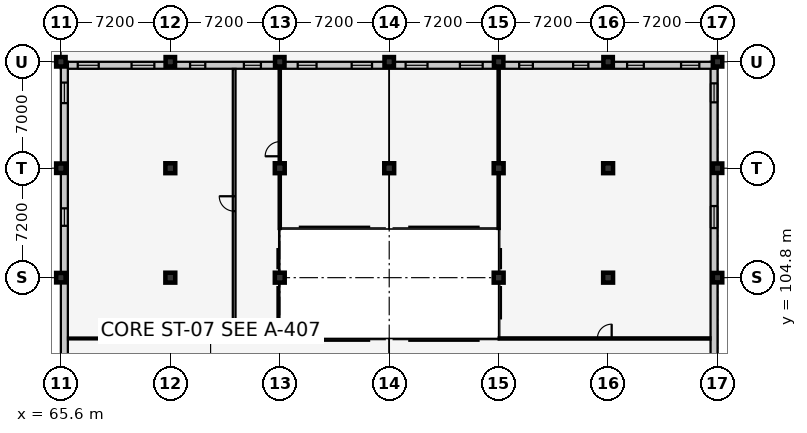
"""IFC4 building model, lengths in metres.
Left out: names, types, materials, properties, quantities, classifications, styles, units other than length and angle.
Written with IfcOpenShell. Run it as: python <this file> out.ifc"""

import sys

from ifc_helpers import new_model, si_unit, direction, frame, frame_2d, origin, origin_2d, place, context, subcontext, project, spatial, rectangle, extrude, element, fill, save


model = new_model("IFC4")
c1 = context("Model", 3, precision=1e-05, world=origin(), true_north=direction((0.0, 1.0)))
c2 = subcontext(c1, "Body", "Model", "MODEL_VIEW")
j1 = project(units=[si_unit("LENGTHUNIT", "METRE"), si_unit("PLANEANGLEUNIT", "RADIAN")], contexts=[c1])
p1 = place(None, origin())
s1 = spatial("IfcSite", under=j1, at=p1, CompositionType="ELEMENT")
p2 = place(p1, origin())
s2 = spatial("IfcBuilding", under=s1, at=p2, CompositionType="ELEMENT")
p3 = place(p2, frame((0.0, 0.0, 5.4)))
s3 = spatial("IfcBuildingStorey", under=s2, at=p3, CompositionType="ELEMENT", Elevation=5.4)
for number, where, z_axis, x_axis in (
    (1, (65.6, 104.8, 0.0), (0.0, 0.0, 1.0), (1.0, 0.0, 0.0)),
    (2, (65.6, 112.0, 0.0), (0.0, 0.0, 1.0), (1.0, 0.0, 0.0)),
    (3, (65.6, 119.0, 0.0), (0.0, 0.0, 1.0), (1.0, 0.0, 0.0)),
):
    element("IfcColumn", number, at=place(p3, frame(where, z_axis=z_axis, x_axis=x_axis)), inside=s3, PredefinedType="COLUMN", context=c2, shape_type="SweptSolid", body=[
        extrude(rectangle(XDim=0.62, YDim=0.62, at=origin_2d()), origin(), (0.0, 0.0, 1.0), 4.2),
    ])
for number, where, z_axis, x_axis in (
    (4, (72.8, 104.8, 0.0), (0.0, 0.0, 1.0), (1.0, 0.0, 0.0)),
    (5, (72.8, 112.0, 0.0), (0.0, 0.0, 1.0), (1.0, 0.0, 0.0)),
):
    element("IfcColumn", number, at=place(p3, frame(where, z_axis=z_axis, x_axis=x_axis)), inside=s3, PredefinedType="COLUMN", context=c2, shape_type="SweptSolid", body=[
        extrude(rectangle(XDim=0.65, YDim=0.65, at=origin_2d()), origin(), (0.0, 0.0, 1.0), 4.2),
    ])
p4 = place(p3, frame((72.8, 119.0, 0.0), z_axis=(0.0, 0.0, 1.0), x_axis=(1.0, 0.0, 0.0)))
e6 = element("IfcColumn", 6, at=p4, inside=s3, PredefinedType="COLUMN", context=c2, shape_type="SweptSolid", body=[
    extrude(rectangle(XDim=0.62, YDim=0.62, at=origin_2d()), origin(), (0.0, 0.0, 1.0), 4.2),
])
for number, where, z_axis, x_axis in (
    (7, (80.0, 104.8, 0.0), (0.0, 0.0, 1.0), (1.0, 0.0, 0.0)),
    (8, (80.0, 112.0, 0.0), (0.0, 0.0, 1.0), (1.0, 0.0, 0.0)),
):
    element("IfcColumn", number, at=place(p3, frame(where, z_axis=z_axis, x_axis=x_axis)), inside=s3, PredefinedType="COLUMN", context=c2, shape_type="SweptSolid", body=[
        extrude(rectangle(XDim=0.65, YDim=0.65, at=origin_2d()), origin(), (0.0, 0.0, 1.0), 4.2),
    ])
p5 = place(p3, frame((80.0, 119.0, 0.0), z_axis=(0.0, 0.0, 1.0), x_axis=(1.0, 0.0, 0.0)))
e9 = element("IfcColumn", 9, at=p5, inside=s3, PredefinedType="COLUMN", context=c2, shape_type="SweptSolid", body=[
    extrude(rectangle(XDim=0.62, YDim=0.62, at=origin_2d()), origin(), (0.0, 0.0, 1.0), 4.2),
])
p6 = place(p3, frame((87.2, 112.0, 0.0), z_axis=(0.0, 0.0, 1.0), x_axis=(1.0, 0.0, 0.0)))
e10 = element("IfcColumn", 10, at=p6, inside=s3, PredefinedType="COLUMN", context=c2, shape_type="SweptSolid", body=[
    extrude(rectangle(XDim=0.65, YDim=0.65, at=origin_2d()), origin(), (0.0, 0.0, 1.0), 4.2),
])
p7 = place(p3, frame((87.2, 119.0, 0.0), z_axis=(0.0, 0.0, 1.0), x_axis=(1.0, 0.0, 0.0)))
e11 = element("IfcColumn", 11, at=p7, inside=s3, PredefinedType="COLUMN", context=c2, shape_type="SweptSolid", body=[
    extrude(rectangle(XDim=0.62, YDim=0.62, at=origin_2d()), origin(), (0.0, 0.0, 1.0), 4.2),
])
for number, where, z_axis, x_axis in (
    (12, (94.4, 104.8, 0.0), (0.0, 0.0, 1.0), (1.0, 0.0, 0.0)),
    (13, (94.4, 112.0, 0.0), (0.0, 0.0, 1.0), (1.0, 0.0, 0.0)),
):
    element("IfcColumn", number, at=place(p3, frame(where, z_axis=z_axis, x_axis=x_axis)), inside=s3, PredefinedType="COLUMN", context=c2, shape_type="SweptSolid", body=[
        extrude(rectangle(XDim=0.65, YDim=0.65, at=origin_2d()), origin(), (0.0, 0.0, 1.0), 4.2),
    ])
p8 = place(p3, frame((94.4, 119.0, 0.0), z_axis=(0.0, 0.0, 1.0), x_axis=(1.0, 0.0, 0.0)))
e14 = element("IfcColumn", 14, at=p8, inside=s3, PredefinedType="COLUMN", context=c2, shape_type="SweptSolid", body=[
    extrude(rectangle(XDim=0.62, YDim=0.62, at=origin_2d()), origin(), (0.0, 0.0, 1.0), 4.2),
])
for number, where, z_axis, x_axis in (
    (15, (101.6, 104.8, 0.0), (0.0, 0.0, 1.0), (1.0, 0.0, 0.0)),
    (16, (101.6, 112.0, 0.0), (0.0, 0.0, 1.0), (1.0, 0.0, 0.0)),
):
    element("IfcColumn", number, at=place(p3, frame(where, z_axis=z_axis, x_axis=x_axis)), inside=s3, PredefinedType="COLUMN", context=c2, shape_type="SweptSolid", body=[
        extrude(rectangle(XDim=0.65, YDim=0.65, at=origin_2d()), origin(), (0.0, 0.0, 1.0), 4.2),
    ])
for number, where, z_axis, x_axis in (
    (17, (101.6, 119.0, 0.0), (0.0, 0.0, 1.0), (1.0, 0.0, 0.0)),
    (18, (108.8, 104.8, 0.0), (0.0, 0.0, 1.0), (1.0, 0.0, 0.0)),
    (19, (108.8, 112.0, 0.0), (0.0, 0.0, 1.0), (1.0, 0.0, 0.0)),
    (20, (108.8, 119.0, 0.0), (0.0, 0.0, 1.0), (1.0, 0.0, 0.0)),
):
    element("IfcColumn", number, at=place(p3, frame(where, z_axis=z_axis, x_axis=x_axis)), inside=s3, PredefinedType="COLUMN", context=c2, shape_type="SweptSolid", body=[
        extrude(rectangle(XDim=0.62, YDim=0.62, at=origin_2d()), origin(), (0.0, 0.0, 1.0), 4.2),
    ])
p9 = place(p3, frame((108.57, 119.0, 0.0), z_axis=(0.0, 0.0, 1.0), x_axis=(0.0, -1.0, 0.0)))
e21 = element("IfcWall", 21, at=p9, inside=s3, PredefinedType="SOLIDWALL", context=c2, shape_type="SweptSolid", body=[
    extrude(rectangle(XDim=28.6, YDim=0.46, at=frame_2d((14.3, 0.0))), origin(), (0.0, 0.0, 1.0), 3.175),
])
p10 = place(p9, frame((1.418, 0.0, 0.9)))
e22 = element("IfcOpeningElement", 22, at=p10, cuts=e21, PredefinedType="OPENING", context=c2, shape_type="SweptSolid", body=[
    extrude(rectangle(XDim=1.25, YDim=1.45, at=frame_2d((0.625, 0.725))), frame((0.0, 0.242, 0.0), z_axis=(0.0, -1.0, 0.0), x_axis=(1.0, 0.0, 0.0)), (0.0, 0.0, 1.0), 0.484),
])
p11 = place(p9, frame((9.489, 0.0, 0.9)))
e23 = element("IfcOpeningElement", 23, at=p11, cuts=e21, PredefinedType="OPENING", context=c2, shape_type="SweptSolid", body=[
    extrude(rectangle(XDim=1.45, YDim=1.45, at=frame_2d((0.725, 0.725))), frame((0.0, 0.242, 0.0), z_axis=(0.0, -1.0, 0.0), x_axis=(1.0, 0.0, 0.0)), (0.0, 0.0, 1.0), 0.484),
])
p12 = place(p9, frame((25.932, 0.0, 0.9)))
e24 = element("IfcOpeningElement", 24, at=p12, cuts=e21, PredefinedType="OPENING", context=c2, shape_type="SweptSolid", body=[
    extrude(rectangle(XDim=1.25, YDim=1.6, at=frame_2d((0.625, 0.8))), frame((0.0, 0.242, 0.0), z_axis=(0.0, -1.0, 0.0), x_axis=(1.0, 0.0, 0.0)), (0.0, 0.0, 1.0), 0.484),
])
p13 = place(p3, frame((65.6, 118.77, 0.0), z_axis=(0.0, 0.0, 1.0), x_axis=(1.0, 0.0, 0.0)))
e25 = element("IfcWall", 25, at=p13, inside=s3, PredefinedType="SOLIDWALL", context=c2, shape_type="SweptSolid", body=[
    extrude(rectangle(XDim=43.2, YDim=0.46, at=frame_2d((21.6, 0.0))), origin(), (0.0, 0.0, 1.0), 3.215),
])
p14 = place(p13, frame((1.11, 0.0, 0.9)))
e26 = element("IfcOpeningElement", 26, at=p14, cuts=e25, PredefinedType="OPENING", context=c2, shape_type="SweptSolid", body=[
    extrude(rectangle(XDim=1.38, YDim=1.6, at=frame_2d((0.69, 0.8))), frame((0.0, 0.242, 0.0), z_axis=(0.0, -1.0, 0.0), x_axis=(1.0, 0.0, 0.0)), (0.0, 0.0, 1.0), 0.484),
])
p15 = place(p13, frame((4.65, 0.0, 0.9)))
e27 = element("IfcOpeningElement", 27, at=p15, cuts=e25, PredefinedType="OPENING", context=c2, shape_type="SweptSolid", body=[
    extrude(rectangle(XDim=1.5, YDim=1.6, at=frame_2d((0.75, 0.8))), frame((0.0, 0.242, 0.0), z_axis=(0.0, -1.0, 0.0), x_axis=(1.0, 0.0, 0.0)), (0.0, 0.0, 1.0), 0.484),
])
p16 = place(p13, frame((8.5, 0.0, 0.9)))
e28 = element("IfcOpeningElement", 28, at=p16, cuts=e25, PredefinedType="OPENING", context=c2, shape_type="SweptSolid", body=[
    extrude(rectangle(XDim=1.0, YDim=1.75, at=frame_2d((0.5, 0.875))), frame((0.0, 0.242, 0.0), z_axis=(0.0, -1.0, 0.0), x_axis=(1.0, 0.0, 0.0)), (0.0, 0.0, 1.0), 0.484),
])
p17 = place(p13, frame((12.04, 0.0, 0.9)))
e29 = element("IfcOpeningElement", 29, at=p17, cuts=e25, PredefinedType="OPENING", context=c2, shape_type="SweptSolid", body=[
    extrude(rectangle(XDim=1.12, YDim=1.75, at=frame_2d((0.56, 0.875))), frame((0.0, 0.242, 0.0), z_axis=(0.0, -1.0, 0.0), x_axis=(1.0, 0.0, 0.0)), (0.0, 0.0, 1.0), 0.484),
])
p18 = place(p13, frame((15.58, 0.0, 0.9)))
e30 = element("IfcOpeningElement", 30, at=p18, cuts=e25, PredefinedType="OPENING", context=c2, shape_type="SweptSolid", body=[
    extrude(rectangle(XDim=1.24, YDim=1.75, at=frame_2d((0.62, 0.875))), frame((0.0, 0.242, 0.0), z_axis=(0.0, -1.0, 0.0), x_axis=(1.0, 0.0, 0.0)), (0.0, 0.0, 1.0), 0.484),
])
p19 = place(p13, frame((19.13, 0.0, 0.9)))
e31 = element("IfcOpeningElement", 31, at=p19, cuts=e25, PredefinedType="OPENING", context=c2, shape_type="SweptSolid", body=[
    extrude(rectangle(XDim=1.34, YDim=1.75, at=frame_2d((0.67, 0.875))), frame((0.0, 0.242, 0.0), z_axis=(0.0, -1.0, 0.0), x_axis=(1.0, 0.0, 0.0)), (0.0, 0.0, 1.0), 0.484),
])
p20 = place(p13, frame((22.68, 0.0, 0.9)))
e32 = element("IfcOpeningElement", 32, at=p20, cuts=e25, PredefinedType="OPENING", context=c2, shape_type="SweptSolid", body=[
    extrude(rectangle(XDim=1.44, YDim=1.75, at=frame_2d((0.72, 0.875))), frame((0.0, 0.242, 0.0), z_axis=(0.0, -1.0, 0.0), x_axis=(1.0, 0.0, 0.0)), (0.0, 0.0, 1.0), 0.484),
])
p21 = place(p13, frame((26.25, 0.0, 0.9)))
e33 = element("IfcOpeningElement", 33, at=p21, cuts=e25, PredefinedType="OPENING", context=c2, shape_type="SweptSolid", body=[
    extrude(rectangle(XDim=1.5, YDim=1.75, at=frame_2d((0.75, 0.875))), frame((0.0, 0.242, 0.0), z_axis=(0.0, -1.0, 0.0), x_axis=(1.0, 0.0, 0.0)), (0.0, 0.0, 1.0), 0.484),
])
p22 = place(p13, frame((30.15, 0.0, 0.9)))
e34 = element("IfcOpeningElement", 34, at=p22, cuts=e25, PredefinedType="OPENING", context=c2, shape_type="SweptSolid", body=[
    extrude(rectangle(XDim=0.9, YDim=1.35, at=frame_2d((0.45, 0.675))), frame((0.0, 0.242, 0.0), z_axis=(0.0, -1.0, 0.0), x_axis=(1.0, 0.0, 0.0)), (0.0, 0.0, 1.0), 0.484),
])
p23 = place(p13, frame((33.7, 0.0, 0.9)))
e35 = element("IfcOpeningElement", 35, at=p23, cuts=e25, PredefinedType="OPENING", context=c2, shape_type="SweptSolid", body=[
    extrude(rectangle(XDim=1.0, YDim=1.35, at=frame_2d((0.5, 0.675))), frame((0.0, 0.242, 0.0), z_axis=(0.0, -1.0, 0.0), x_axis=(1.0, 0.0, 0.0)), (0.0, 0.0, 1.0), 0.484),
])
p24 = place(p13, frame((37.25, 0.0, 0.9)))
e36 = element("IfcOpeningElement", 36, at=p24, cuts=e25, PredefinedType="OPENING", context=c2, shape_type="SweptSolid", body=[
    extrude(rectangle(XDim=1.1, YDim=1.35, at=frame_2d((0.55, 0.675))), frame((0.0, 0.242, 0.0), z_axis=(0.0, -1.0, 0.0), x_axis=(1.0, 0.0, 0.0)), (0.0, 0.0, 1.0), 0.484),
])
p25 = place(p13, frame((40.8, 0.0, 0.9)))
e37 = element("IfcOpeningElement", 37, at=p25, cuts=e25, PredefinedType="OPENING", context=c2, shape_type="SweptSolid", body=[
    extrude(rectangle(XDim=1.2, YDim=1.35, at=frame_2d((0.6, 0.675))), frame((0.0, 0.242, 0.0), z_axis=(0.0, -1.0, 0.0), x_axis=(1.0, 0.0, 0.0)), (0.0, 0.0, 1.0), 0.484),
])
p26 = place(p3, frame((65.83, 90.4, 0.0), z_axis=(0.0, 0.0, 1.0), x_axis=(0.0, 1.0, 0.0)))
e38 = element("IfcWall", 38, at=p26, inside=s3, PredefinedType="SOLIDWALL", context=c2, shape_type="SweptSolid", body=[
    extrude(rectangle(XDim=28.6, YDim=0.46, at=frame_2d((14.3, 0.0))), origin(), (0.0, 0.0, 1.0), 3.175),
])
p27 = place(p26, frame((1.393, 0.0, 0.9)))
e39 = element("IfcOpeningElement", 39, at=p27, cuts=e38, PredefinedType="OPENING", context=c2, shape_type="SweptSolid", body=[
    extrude(rectangle(XDim=1.3, YDim=1.35, at=frame_2d((0.65, 0.675))), frame((0.0, 0.242, 0.0), z_axis=(0.0, -1.0, 0.0), x_axis=(1.0, 0.0, 0.0)), (0.0, 0.0, 1.0), 0.484),
])
p28 = place(p26, frame((17.811, 0.0, 0.9)))
e40 = element("IfcOpeningElement", 40, at=p28, cuts=e38, PredefinedType="OPENING", context=c2, shape_type="SweptSolid", body=[
    extrude(rectangle(XDim=1.15, YDim=1.45, at=frame_2d((0.575, 0.725))), frame((0.0, 0.242, 0.0), z_axis=(0.0, -1.0, 0.0), x_axis=(1.0, 0.0, 0.0)), (0.0, 0.0, 1.0), 0.484),
])
p29 = place(p26, frame((25.882, 0.0, 0.9)))
e41 = element("IfcOpeningElement", 41, at=p29, cuts=e38, PredefinedType="OPENING", context=c2, shape_type="SweptSolid", body=[
    extrude(rectangle(XDim=1.35, YDim=1.45, at=frame_2d((0.675, 0.725))), frame((0.0, 0.242, 0.0), z_axis=(0.0, -1.0, 0.0), x_axis=(1.0, 0.0, 0.0)), (0.0, 0.0, 1.0), 0.484),
])
p30 = place(p3, frame((77.0, 100.8, 0.0), z_axis=(0.0, 0.0, 1.0), x_axis=(0.0, 1.0, 0.0)))
e42 = element("IfcWall", 42, at=p30, inside=s3, PredefinedType="PARTITIONING", context=c2, shape_type="SweptSolid", body=[
    extrude(rectangle(XDim=17.73, YDim=0.18, at=frame_2d((8.865, 0.0))), origin(), (0.0, 0.0, 1.0), 3.92),
])
p31 = place(p30, frame((8.375, 0.0, 0.0)))
e43 = element("IfcOpeningElement", 43, at=p31, cuts=e42, PredefinedType="OPENING", context=c2, shape_type="SweptSolid", body=[
    extrude(rectangle(XDim=0.98, YDim=2.12, at=frame_2d((0.49, 1.06))), frame((0.0, 0.102, 0.0), z_axis=(0.0, -1.0, 0.0), x_axis=(1.0, 0.0, 0.0)), (0.0, 0.0, 1.0), 0.204),
])
p32 = place(p3, frame((66.07, 100.8, 0.0), z_axis=(0.0, 0.0, 1.0), x_axis=(1.0, 0.0, 0.0)))
e44 = element("IfcWall", 44, at=p32, inside=s3, PredefinedType="PARTITIONING", context=c2, shape_type="SweptSolid", body=[
    extrude(rectangle(XDim=10.83, YDim=0.125, at=frame_2d((5.415, 0.0))), origin(), (0.0, 0.0, 1.0), 3.92),
])
p33 = place(p3, frame((80.0, 108.0, 0.0), z_axis=(0.0, 0.0, 1.0), x_axis=(0.0, 1.0, 0.0)))
e45 = element("IfcWall", 45, at=p33, inside=s3, PredefinedType="PARTITIONING", context=c2, shape_type="SweptSolid", body=[
    extrude(rectangle(XDim=10.53, YDim=0.15, at=frame_2d((5.265, 0.0))), origin(), (0.0, 0.0, 1.0), 3.295),
])
p34 = place(p33, frame((4.785, 0.0, 0.0)))
e46 = element("IfcOpeningElement", 46, at=p34, cuts=e45, PredefinedType="OPENING", context=c2, shape_type="SweptSolid", body=[
    extrude(rectangle(XDim=0.96, YDim=2.1, at=frame_2d((0.48, 1.05))), frame((0.0, 0.087, 0.0), z_axis=(0.0, -1.0, 0.0), x_axis=(1.0, 0.0, 0.0)), (0.0, 0.0, 1.0), 0.174),
])
p35 = place(p3, frame((94.4, 108.0, 0.0), z_axis=(0.0, 0.0, 1.0), x_axis=(0.0, 1.0, 0.0)))
e47 = element("IfcWall", 47, at=p35, inside=s3, PredefinedType="PARTITIONING", context=c2, shape_type="SweptSolid", body=[
    extrude(rectangle(XDim=10.53, YDim=0.15, at=frame_2d((5.265, 0.0))), origin(), (0.0, 0.0, 1.0), 3.295),
])
p36 = place(p3, frame((94.4, 100.8, 0.0), z_axis=(0.0, 0.0, 1.0), x_axis=(1.0, 0.0, 0.0)))
e48 = element("IfcWall", 48, at=p36, inside=s3, PredefinedType="PARTITIONING", context=c2, shape_type="SweptSolid", body=[
    extrude(rectangle(XDim=13.93, YDim=0.15, at=frame_2d((6.965, 0.0))), origin(), (0.0, 0.0, 1.0), 3.92),
])
p37 = place(p36, frame((6.495, 0.0, 0.0)))
e49 = element("IfcOpeningElement", 49, at=p37, cuts=e48, PredefinedType="OPENING", context=c2, shape_type="SweptSolid", body=[
    extrude(rectangle(XDim=0.94, YDim=2.1, at=frame_2d((0.47, 1.05))), frame((0.0, 0.087, 0.0), z_axis=(0.0, -1.0, 0.0), x_axis=(1.0, 0.0, 0.0)), (0.0, 0.0, 1.0), 0.174),
])
p38 = place(p10, origin())
e50 = element("IfcWindow", 50, at=p38, inside=s3, PartitioningType="SINGLE_PANEL", PredefinedType="WINDOW", context=c2, shape_type="SweptSolid", body=[
    extrude(rectangle(XDim=1.25, YDim=1.45, at=frame_2d((0.625, 0.725))), frame((0.0, 0.03, 0.0), z_axis=(0.0, -1.0, 0.0), x_axis=(1.0, 0.0, 0.0)), (0.0, 0.0, 1.0), 0.06),
])
fill(e22, e50)
p39 = place(p11, origin())
e51 = element("IfcWindow", 51, at=p39, inside=s3, PartitioningType="SINGLE_PANEL", PredefinedType="WINDOW", context=c2, shape_type="SweptSolid", body=[
    extrude(rectangle(XDim=1.45, YDim=1.45, at=frame_2d((0.725, 0.725))), frame((0.0, 0.03, 0.0), z_axis=(0.0, -1.0, 0.0), x_axis=(1.0, 0.0, 0.0)), (0.0, 0.0, 1.0), 0.06),
])
fill(e23, e51)
p40 = place(p14, origin())
e52 = element("IfcWindow", 52, at=p40, inside=s3, PartitioningType="SINGLE_PANEL", PredefinedType="WINDOW", context=c2, shape_type="SweptSolid", body=[
    extrude(rectangle(XDim=1.38, YDim=1.6, at=frame_2d((0.69, 0.8))), frame((0.0, 0.03, 0.0), z_axis=(0.0, -1.0, 0.0), x_axis=(1.0, 0.0, 0.0)), (0.0, 0.0, 1.0), 0.06),
])
fill(e26, e52)
p41 = place(p15, origin())
e53 = element("IfcWindow", 53, at=p41, inside=s3, PartitioningType="SINGLE_PANEL", PredefinedType="WINDOW", context=c2, shape_type="SweptSolid", body=[
    extrude(rectangle(XDim=1.5, YDim=1.6, at=frame_2d((0.75, 0.8))), frame((0.0, 0.03, 0.0), z_axis=(0.0, -1.0, 0.0), x_axis=(1.0, 0.0, 0.0)), (0.0, 0.0, 1.0), 0.06),
])
fill(e27, e53)
p42 = place(p16, origin())
e54 = element("IfcWindow", 54, at=p42, inside=s3, PartitioningType="SINGLE_PANEL", PredefinedType="WINDOW", context=c2, shape_type="SweptSolid", body=[
    extrude(rectangle(XDim=1.0, YDim=1.75, at=frame_2d((0.5, 0.875))), frame((0.0, 0.03, 0.0), z_axis=(0.0, -1.0, 0.0), x_axis=(1.0, 0.0, 0.0)), (0.0, 0.0, 1.0), 0.06),
])
fill(e28, e54)
p43 = place(p17, origin())
e55 = element("IfcWindow", 55, at=p43, inside=s3, PartitioningType="SINGLE_PANEL", PredefinedType="WINDOW", context=c2, shape_type="SweptSolid", body=[
    extrude(rectangle(XDim=1.12, YDim=1.75, at=frame_2d((0.56, 0.875))), frame((0.0, 0.03, 0.0), z_axis=(0.0, -1.0, 0.0), x_axis=(1.0, 0.0, 0.0)), (0.0, 0.0, 1.0), 0.06),
])
fill(e29, e55)
p44 = place(p18, origin())
e56 = element("IfcWindow", 56, at=p44, inside=s3, PartitioningType="SINGLE_PANEL", PredefinedType="WINDOW", context=c2, shape_type="SweptSolid", body=[
    extrude(rectangle(XDim=1.24, YDim=1.75, at=frame_2d((0.62, 0.875))), frame((0.0, 0.03, 0.0), z_axis=(0.0, -1.0, 0.0), x_axis=(1.0, 0.0, 0.0)), (0.0, 0.0, 1.0), 0.06),
])
fill(e30, e56)
p45 = place(p19, origin())
e57 = element("IfcWindow", 57, at=p45, inside=s3, PartitioningType="SINGLE_PANEL", PredefinedType="WINDOW", context=c2, shape_type="SweptSolid", body=[
    extrude(rectangle(XDim=1.34, YDim=1.75, at=frame_2d((0.67, 0.875))), frame((0.0, 0.03, 0.0), z_axis=(0.0, -1.0, 0.0), x_axis=(1.0, 0.0, 0.0)), (0.0, 0.0, 1.0), 0.06),
])
fill(e31, e57)
p46 = place(p20, origin())
e58 = element("IfcWindow", 58, at=p46, inside=s3, PartitioningType="SINGLE_PANEL", PredefinedType="WINDOW", context=c2, shape_type="SweptSolid", body=[
    extrude(rectangle(XDim=1.44, YDim=1.75, at=frame_2d((0.72, 0.875))), frame((0.0, 0.03, 0.0), z_axis=(0.0, -1.0, 0.0), x_axis=(1.0, 0.0, 0.0)), (0.0, 0.0, 1.0), 0.06),
])
fill(e32, e58)
p47 = place(p21, origin())
e59 = element("IfcWindow", 59, at=p47, inside=s3, PartitioningType="SINGLE_PANEL", PredefinedType="WINDOW", context=c2, shape_type="SweptSolid", body=[
    extrude(rectangle(XDim=1.5, YDim=1.75, at=frame_2d((0.75, 0.875))), frame((0.0, 0.03, 0.0), z_axis=(0.0, -1.0, 0.0), x_axis=(1.0, 0.0, 0.0)), (0.0, 0.0, 1.0), 0.06),
])
fill(e33, e59)
p48 = place(p22, origin())
e60 = element("IfcWindow", 60, at=p48, inside=s3, PartitioningType="SINGLE_PANEL", PredefinedType="WINDOW", context=c2, shape_type="SweptSolid", body=[
    extrude(rectangle(XDim=0.9, YDim=1.35, at=frame_2d((0.45, 0.675))), frame((0.0, 0.03, 0.0), z_axis=(0.0, -1.0, 0.0), x_axis=(1.0, 0.0, 0.0)), (0.0, 0.0, 1.0), 0.06),
])
fill(e34, e60)
p49 = place(p23, origin())
e61 = element("IfcWindow", 61, at=p49, inside=s3, PartitioningType="SINGLE_PANEL", PredefinedType="WINDOW", context=c2, shape_type="SweptSolid", body=[
    extrude(rectangle(XDim=1.0, YDim=1.35, at=frame_2d((0.5, 0.675))), frame((0.0, 0.03, 0.0), z_axis=(0.0, -1.0, 0.0), x_axis=(1.0, 0.0, 0.0)), (0.0, 0.0, 1.0), 0.06),
])
fill(e35, e61)
p50 = place(p24, origin())
e62 = element("IfcWindow", 62, at=p50, inside=s3, PartitioningType="SINGLE_PANEL", PredefinedType="WINDOW", context=c2, shape_type="SweptSolid", body=[
    extrude(rectangle(XDim=1.1, YDim=1.35, at=frame_2d((0.55, 0.675))), frame((0.0, 0.03, 0.0), z_axis=(0.0, -1.0, 0.0), x_axis=(1.0, 0.0, 0.0)), (0.0, 0.0, 1.0), 0.06),
])
fill(e36, e62)
p51 = place(p25, origin())
e63 = element("IfcWindow", 63, at=p51, inside=s3, PartitioningType="SINGLE_PANEL", PredefinedType="WINDOW", context=c2, shape_type="SweptSolid", body=[
    extrude(rectangle(XDim=1.2, YDim=1.35, at=frame_2d((0.6, 0.675))), frame((0.0, 0.03, 0.0), z_axis=(0.0, -1.0, 0.0), x_axis=(1.0, 0.0, 0.0)), (0.0, 0.0, 1.0), 0.06),
])
fill(e37, e63)
p52 = place(p28, origin())
e64 = element("IfcWindow", 64, at=p52, inside=s3, PartitioningType="SINGLE_PANEL", PredefinedType="WINDOW", context=c2, shape_type="SweptSolid", body=[
    extrude(rectangle(XDim=1.15, YDim=1.45, at=frame_2d((0.575, 0.725))), frame((0.0, 0.03, 0.0), z_axis=(0.0, -1.0, 0.0), x_axis=(1.0, 0.0, 0.0)), (0.0, 0.0, 1.0), 0.06),
])
fill(e40, e64)
p53 = place(p29, origin())
e65 = element("IfcWindow", 65, at=p53, inside=s3, PartitioningType="SINGLE_PANEL", PredefinedType="WINDOW", context=c2, shape_type="SweptSolid", body=[
    extrude(rectangle(XDim=1.35, YDim=1.45, at=frame_2d((0.675, 0.725))), frame((0.0, 0.03, 0.0), z_axis=(0.0, -1.0, 0.0), x_axis=(1.0, 0.0, 0.0)), (0.0, 0.0, 1.0), 0.06),
])
fill(e41, e65)
p54 = place(p31, origin())
e66 = element("IfcDoor", 66, at=p54, inside=s3, OperationType="SINGLE_SWING_RIGHT", PredefinedType="DOOR", context=c2, shape_type="SweptSolid", body=[
    extrude(rectangle(XDim=0.98, YDim=2.12, at=frame_2d((0.49, 1.06))), frame((0.0, 0.025, 0.0), z_axis=(0.0, -1.0, 0.0), x_axis=(1.0, 0.0, 0.0)), (0.0, 0.0, 1.0), 0.05),
])
fill(e43, e66)
p55 = place(p34, origin())
e67 = element("IfcDoor", 67, at=p55, inside=s3, OperationType="SINGLE_SWING_LEFT", PredefinedType="DOOR", context=c2, shape_type="SweptSolid", body=[
    extrude(rectangle(XDim=0.96, YDim=2.1, at=frame_2d((0.48, 1.05))), frame((0.0, 0.025, 0.0), z_axis=(0.0, -1.0, 0.0), x_axis=(1.0, 0.0, 0.0)), (0.0, 0.0, 1.0), 0.05),
])
fill(e46, e67)
p56 = place(p37, origin())
e68 = element("IfcDoor", 68, at=p56, inside=s3, OperationType="SINGLE_SWING_RIGHT", PredefinedType="DOOR", context=c2, shape_type="SweptSolid", body=[
    extrude(rectangle(XDim=0.94, YDim=2.1, at=frame_2d((0.47, 1.05))), frame((0.0, 0.025, 0.0), z_axis=(0.0, -1.0, 0.0), x_axis=(1.0, 0.0, 0.0)), (0.0, 0.0, 1.0), 0.05),
])
fill(e49, e68)
save(model, sys.argv[1])
